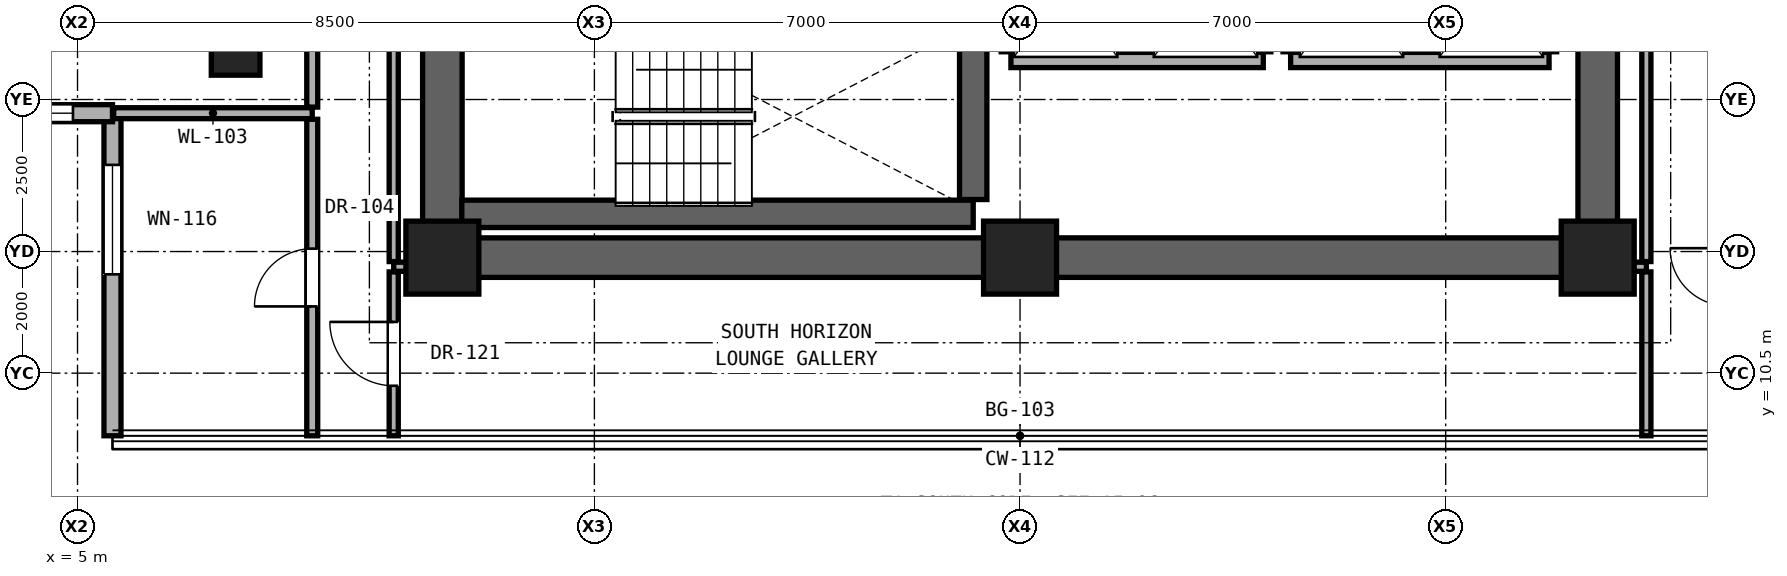
"""IFC4 building model, lengths in metres.
Left out: names, types, materials, properties, quantities, classifications, styles, units other than length and angle.
Written with IfcOpenShell. Run it as: python <this file> out.ifc"""

import sys

from ifc_helpers import new_model, si_unit, direction, frame, frame_2d, origin, origin_2d, place, context, subcontext, project, spatial, rectangle, extrude, element, fill, save


model = new_model("IFC4")
c1 = context("Model", 3, precision=1e-05, world=origin(), true_north=direction((0.0, 1.0)))
c2 = subcontext(c1, "Body", "Model", "MODEL_VIEW")
j1 = project(units=[si_unit("LENGTHUNIT", "METRE"), si_unit("PLANEANGLEUNIT", "RADIAN")], contexts=[c1])
p1 = place(None, origin())
s1 = spatial("IfcSite", under=j1, at=p1, CompositionType="ELEMENT")
p2 = place(p1, origin())
s2 = spatial("IfcBuilding", under=s1, at=p2, CompositionType="ELEMENT")
p3 = place(p2, frame((0.0, 0.0, 88.4)))
s3 = spatial("IfcBuildingStorey", under=s2, at=p3, CompositionType="ELEMENT", Elevation=88.4)
for number, where, z_axis, x_axis in (
    (1, (11.0, 12.4, 0.0), (0.0, 0.0, 1.0), (1.0, 0.0, 0.0)),
    (2, (20.5, 12.4, 0.0), (0.0, 0.0, 1.0), (1.0, 0.0, 0.0)),
    (3, (30.0, 12.4, 0.0), (0.0, 0.0, 1.0), (1.0, 0.0, 0.0)),
):
    element("IfcColumn", number, at=place(p3, frame(where, z_axis=z_axis, x_axis=x_axis)), inside=s3, PredefinedType="COLUMN", context=c2, shape_type="SweptSolid", body=[
        extrude(rectangle(XDim=1.2, YDim=1.2, at=origin_2d()), origin(), (0.0, 0.0, 1.0), 3.3),
    ])
p4 = place(p3, frame((7.6, 16.0, 0.0), z_axis=(0.0, 0.0, 1.0), x_axis=(1.0, 0.0, 0.0)))
e4 = element("IfcColumn", 4, at=p4, inside=s3, PredefinedType="PILASTER", context=c2, shape_type="SweptSolid", body=[
    extrude(rectangle(XDim=0.8, YDim=1.2, at=origin_2d()), origin(), (0.0, 0.0, 1.0), 3.3),
])
p5 = place(p3, frame((11.0, 12.4, 0.0), z_axis=(0.0, 0.0, 1.0), x_axis=(1.0, 0.0, 0.0)))
e5 = element("IfcWall", 5, at=p5, inside=s3, PredefinedType="SHEAR", context=c2, shape_type="SweptSolid", body=[
    extrude(rectangle(XDim=19.0, YDim=0.65, at=frame_2d((9.5, 0.0))), origin(), (0.0, 0.0, 1.0), 3.08),
])
for number, where, z_axis, x_axis in (
    (6, (11.0, 12.4, 0.0), (0.0, 0.0, 1.0), (0.0, 1.0, 0.0)),
    (7, (30.0, 12.4, 0.0), (0.0, 0.0, 1.0), (0.0, 1.0, 0.0)),
):
    element("IfcWall", number, at=place(p3, frame(where, z_axis=z_axis, x_axis=x_axis)), inside=s3, PredefinedType="SHEAR", context=c2, shape_type="SweptSolid", body=[
        extrude(rectangle(XDim=6.0, YDim=0.65, at=frame_2d((3.0, 0.0))), origin(), (0.0, 0.0, 1.0), 3.08),
    ])
p6 = place(p3, frame((5.575, 14.775, 0.0), z_axis=(0.0, 0.0, 1.0), x_axis=(0.0, -1.0, 0.0)))
e8 = element("IfcWall", 8, at=p6, inside=s3, PredefinedType="SOLIDWALL", context=c2, shape_type="SweptSolid", body=[
    extrude(rectangle(XDim=5.305, YDim=0.28, at=frame_2d((2.652, 0.0))), origin(), (0.0, 0.0, 1.0), 3.06),
])
p7 = place(p6, frame((0.85, 0.0, 0.81)))
e9 = element("IfcOpeningElement", 9, at=p7, cuts=e8, PredefinedType="OPENING", context=c2, shape_type="SweptSolid", body=[
    extrude(rectangle(XDim=1.8, YDim=2.1, at=frame_2d((0.9, 1.05))), frame((0.0, 0.15, 0.0), z_axis=(0.0, -1.0, 0.0), x_axis=(1.0, 0.0, 0.0)), (0.0, 0.0, 1.0), 0.3),
])
p8 = place(p3, frame((0.27, 14.775, 0.0), z_axis=(0.0, 0.0, 1.0), x_axis=(1.0, 0.0, 0.0)))
e10 = element("IfcWall", 10, at=p8, inside=s3, PredefinedType="SOLIDWALL", context=c2, shape_type="SweptSolid", body=[
    extrude(rectangle(XDim=5.305, YDim=0.28, at=frame_2d((2.652, 0.0))), origin(), (0.0, 0.0, 1.0), 3.06),
])
p9 = place(p8, frame((3.555, 0.0, 0.85)))
e11 = element("IfcOpeningElement", 11, at=p9, cuts=e10, PredefinedType="OPENING", context=c2, shape_type="SweptSolid", body=[
    extrude(rectangle(XDim=1.1, YDim=2.0, at=frame_2d((0.55, 1.0))), frame((0.0, 0.15, 0.0), z_axis=(0.0, -1.0, 0.0), x_axis=(1.0, 0.0, 0.0)), (0.0, 0.0, 1.0), 0.3),
])
for number, where, z_axis, x_axis in (
    (12, (10.2, 12.25, 0.0), (0.0, 0.0, 1.0), (1.0, 0.0, 0.0)),
    (13, (30.32, 12.25, 0.0), (0.0, 0.0, 1.0), (1.0, 0.0, 0.0)),
):
    element("IfcWall", number, at=place(p3, frame(where, z_axis=z_axis, x_axis=x_axis)), inside=s3, PredefinedType="PARTITIONING", context=c2, shape_type="SweptSolid", body=[
        extrude(rectangle(XDim=0.48, YDim=0.15, at=frame_2d((0.24, 0.0))), origin(), (0.0, 0.0, 1.0), 3.08),
    ])
p10 = place(p3, frame((11.32, 13.12, 0.0), z_axis=(0.0, 0.0, 1.0), x_axis=(1.0, 0.0, 0.0)))
e14 = element("IfcWall", 14, at=p10, inside=s3, PredefinedType="SHEAR", context=c2, shape_type="SweptSolid", body=[
    extrude(rectangle(XDim=8.41, YDim=0.45, at=frame_2d((4.205, 0.0))), origin(), (0.0, 0.0, 1.0), 3.08),
])
p11 = place(p3, frame((5.595, 14.775, 0.0), z_axis=(0.0, 0.0, 1.0), x_axis=(1.0, 0.0, 0.0)))
e15 = element("IfcWall", 15, at=p11, inside=s3, PredefinedType="PARTITIONING", context=c2, shape_type="SweptSolid", body=[
    extrude(rectangle(XDim=3.265, YDim=0.18, at=frame_2d((1.633, 0.0))), origin(), (0.0, 0.0, 1.0), 3.08),
])
p12 = place(p3, frame((20.35, 15.65, 0.0), z_axis=(0.0, 0.0, 1.0), x_axis=(1.0, 0.0, 0.0)))
e16 = element("IfcWall", 16, at=p12, inside=s3, PredefinedType="SOLIDWALL", context=c2, shape_type="SweptSolid", body=[
    extrude(rectangle(XDim=4.15, YDim=0.25, at=frame_2d((2.075, 0.0))), origin(), (0.0, 0.0, 1.0), 3.08),
])
p13 = place(p3, frame((24.95, 15.65, 0.0), z_axis=(0.0, 0.0, 1.0), x_axis=(1.0, 0.0, 0.0)))
e17 = element("IfcWall", 17, at=p13, inside=s3, PredefinedType="SOLIDWALL", context=c2, shape_type="SweptSolid", body=[
    extrude(rectangle(XDim=4.25, YDim=0.25, at=frame_2d((2.125, 0.0))), origin(), (0.0, 0.0, 1.0), 3.08),
])
p14 = place(p3, frame((8.86, 9.47, 0.0), z_axis=(0.0, 0.0, 1.0), x_axis=(0.0, 1.0, 0.0)))
e18 = element("IfcWall", 18, at=p14, inside=s3, PredefinedType="PARTITIONING", context=c2, shape_type="SweptSolid", body=[
    extrude(rectangle(XDim=5.205, YDim=0.18, at=frame_2d((2.603, 0.0))), origin(), (0.0, 0.0, 1.0), 3.08),
])
p15 = place(p14, frame((2.127, 0.0, 0.0)))
e19 = element("IfcOpeningElement", 19, at=p15, cuts=e18, PredefinedType="OPENING", context=c2, shape_type="SweptSolid", body=[
    extrude(rectangle(XDim=0.95, YDim=2.15, at=frame_2d((0.475, 1.075))), frame((0.0, 0.1, 0.0), z_axis=(0.0, -1.0, 0.0), x_axis=(1.0, 0.0, 0.0)), (0.0, 0.0, 1.0), 0.2),
])
p16 = place(p3, frame((8.86, 14.875, 0.0), z_axis=(0.0, 0.0, 1.0), x_axis=(0.0, 1.0, 0.0)))
e20 = element("IfcWall", 20, at=p16, inside=s3, PredefinedType="PARTITIONING", context=c2, shape_type="SweptSolid", body=[
    extrude(rectangle(XDim=5.643, YDim=0.18, at=frame_2d((2.822, 0.0))), origin(), (0.0, 0.0, 1.0), 2.456),
])
p17 = place(p16, frame((2.296, 0.0, 0.0)))
e21 = element("IfcOpeningElement", 21, at=p17, cuts=e20, PredefinedType="OPENING", context=c2, shape_type="SweptSolid", body=[
    extrude(rectangle(XDim=1.05, YDim=2.2, at=frame_2d((0.525, 1.1))), frame((0.0, 0.1, 0.0), z_axis=(0.0, -1.0, 0.0), x_axis=(1.0, 0.0, 0.0)), (0.0, 0.0, 1.0), 0.2),
])
p18 = place(p3, frame((10.2, 9.47, 0.0), z_axis=(0.0, 0.0, 1.0), x_axis=(0.0, 1.0, 0.0)))
e22 = element("IfcWall", 22, at=p18, inside=s3, PredefinedType="PARTITIONING", context=c2, shape_type="SweptSolid", body=[
    extrude(rectangle(XDim=2.695, YDim=0.15, at=frame_2d((1.348, 0.0))), origin(), (0.0, 0.0, 1.0), 3.08),
])
p19 = place(p18, frame((0.823, 0.0, 0.0)))
e23 = element("IfcOpeningElement", 23, at=p19, cuts=e22, PredefinedType="OPENING", context=c2, shape_type="SweptSolid", body=[
    extrude(rectangle(XDim=1.05, YDim=2.2, at=frame_2d((0.525, 1.1))), frame((0.0, 0.085, 0.0), z_axis=(0.0, -1.0, 0.0), x_axis=(1.0, 0.0, 0.0)), (0.0, 0.0, 1.0), 0.17),
])
p20 = place(p3, frame((10.2, 12.335, 0.0), z_axis=(0.0, 0.0, 1.0), x_axis=(0.0, 1.0, 0.0)))
e24 = element("IfcWall", 24, at=p20, inside=s3, PredefinedType="PARTITIONING", context=c2, shape_type="SweptSolid", body=[
    extrude(rectangle(XDim=5.98, YDim=0.15, at=frame_2d((2.99, 0.0))), origin(), (0.0, 0.0, 1.0), 2.456),
])
p21 = place(p3, frame((19.73, 13.355, 0.0), z_axis=(0.0, 0.0, 1.0), x_axis=(0.0, 1.0, 0.0)))
e25 = element("IfcWall", 25, at=p21, inside=s3, PredefinedType="SHEAR", context=c2, shape_type="SweptSolid", body=[
    extrude(rectangle(XDim=2.73, YDim=0.45, at=frame_2d((1.365, 0.0))), origin(), (0.0, 0.0, 1.0), 3.08),
])
p22 = place(p3, frame((30.8, 9.47, 0.0), z_axis=(0.0, 0.0, 1.0), x_axis=(0.0, 1.0, 0.0)))
e26 = element("IfcWall", 26, at=p22, inside=s3, PredefinedType="PARTITIONING", context=c2, shape_type="SweptSolid", body=[
    extrude(rectangle(XDim=2.695, YDim=0.15, at=frame_2d((1.348, 0.0))), origin(), (0.0, 0.0, 1.0), 3.08),
])
p23 = place(p3, frame((30.8, 12.335, 0.0), z_axis=(0.0, 0.0, 1.0), x_axis=(0.0, 1.0, 0.0)))
e27 = element("IfcWall", 27, at=p23, inside=s3, PredefinedType="PARTITIONING", context=c2, shape_type="SweptSolid", body=[
    extrude(rectangle(XDim=5.98, YDim=0.15, at=frame_2d((2.99, 0.0))), origin(), (0.0, 0.0, 1.0), 2.456),
])
p24 = place(p7, origin())
e28 = element("IfcWindow", 28, at=p24, inside=s3, PartitioningType="SINGLE_PANEL", PredefinedType="WINDOW", context=c2, shape_type="SweptSolid", body=[
    extrude(rectangle(XDim=1.8, YDim=2.1, at=frame_2d((0.9, 1.05))), frame((0.0, 0.03, 0.0), z_axis=(0.0, -1.0, 0.0), x_axis=(1.0, 0.0, 0.0)), (0.0, 0.0, 1.0), 0.06),
])
fill(e9, e28)
p25 = place(p9, origin())
e29 = element("IfcWindow", 29, at=p25, inside=s3, PartitioningType="SINGLE_PANEL", PredefinedType="WINDOW", context=c2, shape_type="SweptSolid", body=[
    extrude(rectangle(XDim=1.1, YDim=2.0, at=frame_2d((0.55, 1.0))), frame((0.0, 0.03, 0.0), z_axis=(0.0, -1.0, 0.0), x_axis=(1.0, 0.0, 0.0)), (0.0, 0.0, 1.0), 0.06),
])
fill(e11, e29)
p26 = place(p19, origin())
e30 = element("IfcDoor", 30, at=p26, inside=s3, OperationType="SINGLE_SWING_RIGHT", PredefinedType="DOOR", context=c2, shape_type="SweptSolid", body=[
    extrude(rectangle(XDim=1.05, YDim=2.2, at=frame_2d((0.525, 1.1))), frame((0.0, 0.025, 0.0), z_axis=(0.0, -1.0, 0.0), x_axis=(1.0, 0.0, 0.0)), (0.0, 0.0, 1.0), 0.05),
])
fill(e23, e30)
p27 = place(p15, origin())
e31 = element("IfcDoor", 31, at=p27, inside=s3, OperationType="SINGLE_SWING_LEFT", PredefinedType="DOOR", context=c2, shape_type="SweptSolid", body=[
    extrude(rectangle(XDim=0.95, YDim=2.15, at=frame_2d((0.475, 1.075))), frame((0.0, 0.025, 0.0), z_axis=(0.0, -1.0, 0.0), x_axis=(1.0, 0.0, 0.0)), (0.0, 0.0, 1.0), 0.05),
])
fill(e19, e31)
save(model, sys.argv[1])
